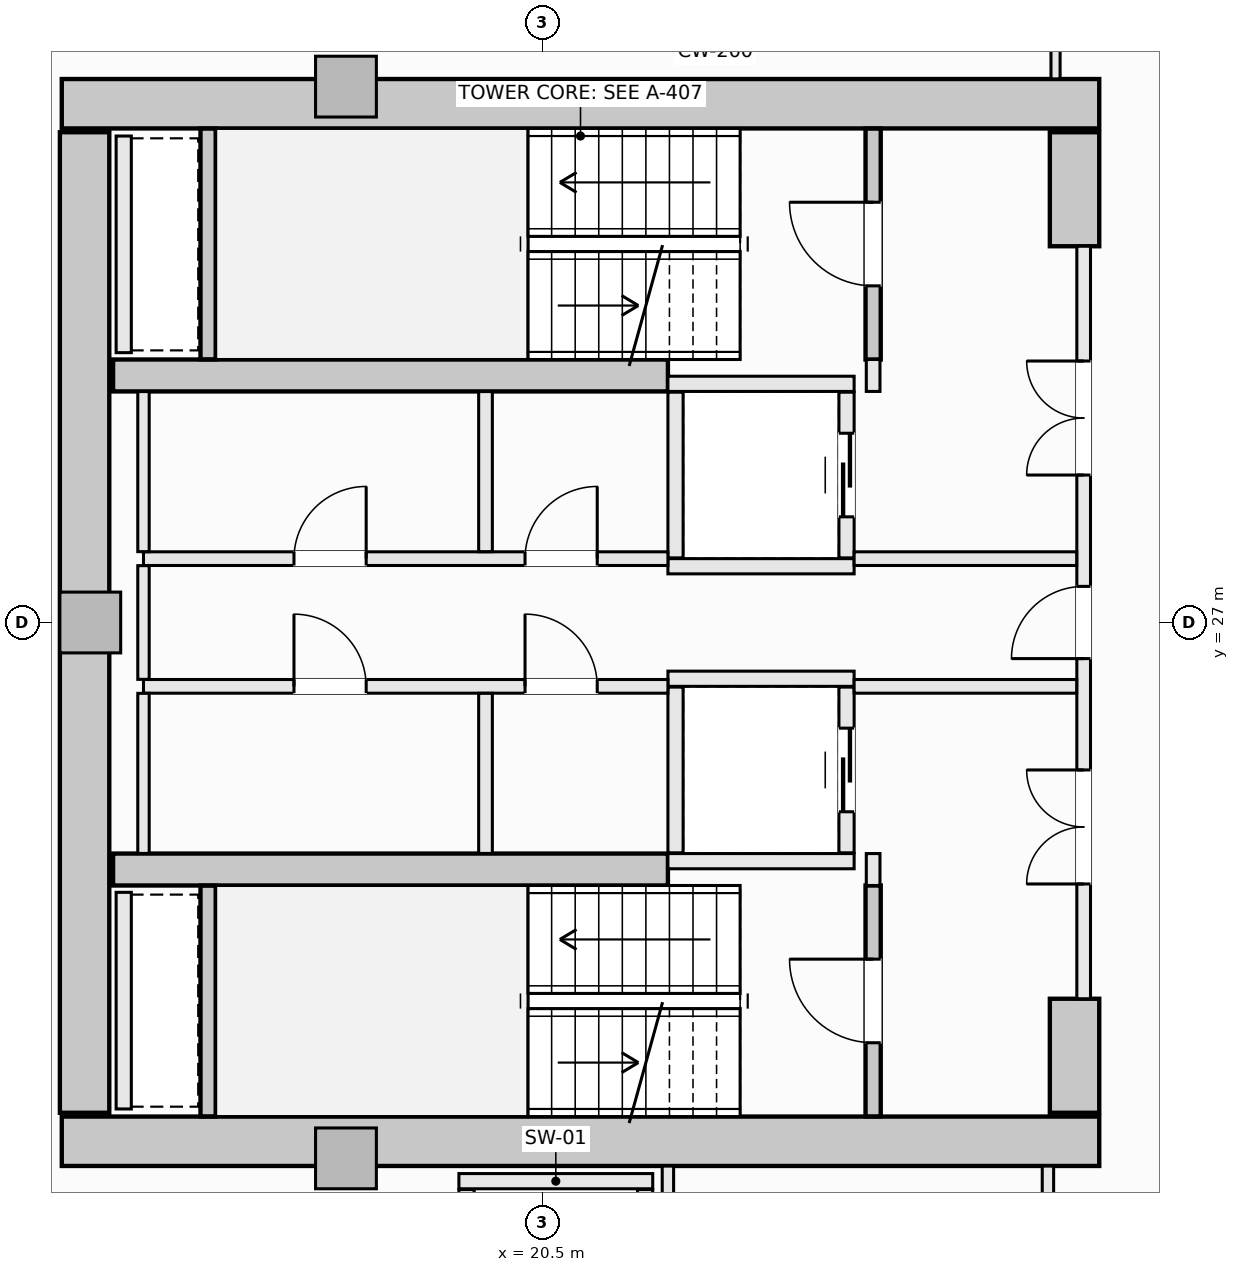
"""IFC4 building model, lengths in metres.
Left out: names, types, materials, properties, quantities, classifications, styles, units other than length and angle.
Written with IfcOpenShell. Run it as: python <this file> out.ifc"""

import sys

from ifc_helpers import new_model, si_unit, direction, frame, frame_2d, origin, origin_2d, place, context, subcontext, project, spatial, rectangle, extrude, element, fill, save


model = new_model("IFC4")
c1 = context("Model", 3, precision=1e-05, world=origin(), true_north=direction((0.0, 1.0)))
c2 = subcontext(c1, "Body", "Model", "MODEL_VIEW")
j1 = project(units=[si_unit("LENGTHUNIT", "METRE"), si_unit("PLANEANGLEUNIT", "RADIAN")], contexts=[c1])
p1 = place(None, origin())
s1 = spatial("IfcSite", under=j1, at=p1, CompositionType="ELEMENT")
p2 = place(p1, origin())
s2 = spatial("IfcBuilding", under=s1, at=p2, CompositionType="ELEMENT")
p3 = place(p2, frame((0.0, 0.0, 183.5)))
s3 = spatial("IfcBuildingStorey", under=s2, at=p3, CompositionType="ELEMENT", Elevation=183.5)
for number, where, z_axis, x_axis in (
    (1, (14.175, 33.825, -0.27), (0.0, 0.0, 1.0), (1.0, 0.0, 0.0)),
    (2, (14.175, 20.175, -0.27), (0.0, 0.0, 1.0), (1.0, 0.0, 0.0)),
):
    element("IfcWall", number, at=place(p3, frame(where, z_axis=z_axis, x_axis=x_axis)), inside=s3, PredefinedType="SHEAR", context=c2, shape_type="SweptSolid", body=[
        extrude(rectangle(XDim=13.65, YDim=0.65, at=frame_2d((6.825, 0.0))), origin(), (0.0, 0.0, 1.0), 3.35),
    ])
p4 = place(p3, frame((14.475, 20.55, -0.27), z_axis=(0.0, 0.0, 1.0), x_axis=(0.0, 1.0, 0.0)))
e3 = element("IfcWall", 3, at=p4, inside=s3, PredefinedType="SHEAR", context=c2, shape_type="SweptSolid", body=[
    extrude(rectangle(XDim=12.9, YDim=0.65, at=frame_2d((6.45, 0.0))), origin(), (0.0, 0.0, 1.0), 3.35),
])
for number, where, z_axis, x_axis in (
    (4, (27.5, 31.95, -0.27), (0.0, 0.0, 1.0), (0.0, 1.0, 0.0)),
    (5, (27.5, 20.55, -0.27), (0.0, 0.0, 1.0), (0.0, 1.0, 0.0)),
):
    element("IfcWall", number, at=place(p3, frame(where, z_axis=z_axis, x_axis=x_axis)), inside=s3, PredefinedType="SHEAR", context=c2, shape_type="SweptSolid", body=[
        extrude(rectangle(XDim=1.5, YDim=0.65, at=frame_2d((0.75, 0.0))), origin(), (0.0, 0.0, 1.0), 3.35),
    ])
for number, where, z_axis, x_axis in (
    (6, (14.85, 30.25, -0.27), (0.0, 0.0, 1.0), (1.0, 0.0, 0.0)),
    (7, (14.85, 23.75, -0.27), (0.0, 0.0, 1.0), (1.0, 0.0, 0.0)),
):
    element("IfcWall", number, at=place(p3, frame(where, z_axis=z_axis, x_axis=x_axis)), inside=s3, PredefinedType="SHEAR", context=c2, shape_type="SweptSolid", body=[
        extrude(rectangle(XDim=7.3, YDim=0.42, at=frame_2d((3.65, 0.0))), origin(), (0.0, 0.0, 1.0), 3.35),
    ])
for number, where, z_axis, x_axis in (
    (8, (17.914, 34.05, -0.27), (0.0, 0.0, 1.0), (1.0, 0.0, 0.0)),
    (9, (14.55, 27.0, -0.27), (0.0, 0.0, 1.0), (1.0, 0.0, 0.0)),
    (10, (17.914, 19.95, -0.27), (0.0, 0.0, 1.0), (1.0, 0.0, 0.0)),
):
    element("IfcColumn", number, at=place(p3, frame(where, z_axis=z_axis, x_axis=x_axis)), inside=s3, PredefinedType="PILASTER", context=c2, shape_type="SweptSolid", body=[
        extrude(rectangle(XDim=0.8, YDim=0.8, at=origin_2d()), origin(), (0.0, 0.0, 1.0), 3.35),
    ])
p5 = place(p3, frame((24.85, 30.46, -0.27), z_axis=(0.0, 0.0, 1.0), x_axis=(0.0, 1.0, 0.0)))
e11 = element("IfcWall", 11, at=p5, inside=s3, PredefinedType="SHEAR", context=c2, shape_type="SweptSolid", body=[
    extrude(rectangle(XDim=3.038, YDim=0.2, at=frame_2d((1.519, 0.0))), origin(), (0.0, 0.0, 1.0), 3.35),
])
p6 = place(p5, frame((0.969, 0.0, 0.27)))
e12 = element("IfcOpeningElement", 12, at=p6, cuts=e11, PredefinedType="OPENING", context=c2, shape_type="SweptSolid", body=[
    extrude(rectangle(XDim=1.1, YDim=2.15, at=frame_2d((0.55, 1.075))), frame((0.0, 0.11, 0.0), z_axis=(0.0, -1.0, 0.0), x_axis=(1.0, 0.0, 0.0)), (0.0, 0.0, 1.0), 0.22),
])
p7 = place(p3, frame((16.1, 30.462, -0.27), z_axis=(0.0, 0.0, 1.0), x_axis=(0.0, 1.0, 0.0)))
e13 = element("IfcWall", 13, at=p7, inside=s3, PredefinedType="SHEAR", context=c2, shape_type="SweptSolid", body=[
    extrude(rectangle(XDim=3.036, YDim=0.2, at=frame_2d((1.518, 0.0))), origin(), (0.0, 0.0, 1.0), 3.35),
])
p8 = place(p3, frame((24.85, 20.502, -0.27), z_axis=(0.0, 0.0, 1.0), x_axis=(0.0, 1.0, 0.0)))
e14 = element("IfcWall", 14, at=p8, inside=s3, PredefinedType="SHEAR", context=c2, shape_type="SweptSolid", body=[
    extrude(rectangle(XDim=3.038, YDim=0.2, at=frame_2d((1.519, 0.0))), origin(), (0.0, 0.0, 1.0), 3.35),
])
p9 = place(p8, frame((0.969, 0.0, 0.27)))
e15 = element("IfcOpeningElement", 15, at=p9, cuts=e14, PredefinedType="OPENING", context=c2, shape_type="SweptSolid", body=[
    extrude(rectangle(XDim=1.1, YDim=2.15, at=frame_2d((0.55, 1.075))), frame((0.0, 0.11, 0.0), z_axis=(0.0, -1.0, 0.0), x_axis=(1.0, 0.0, 0.0)), (0.0, 0.0, 1.0), 0.22),
])
p10 = place(p3, frame((16.1, 20.502, -0.27), z_axis=(0.0, 0.0, 1.0), x_axis=(0.0, 1.0, 0.0)))
e16 = element("IfcWall", 16, at=p10, inside=s3, PredefinedType="SHEAR", context=c2, shape_type="SweptSolid", body=[
    extrude(rectangle(XDim=3.036, YDim=0.2, at=frame_2d((1.518, 0.0))), origin(), (0.0, 0.0, 1.0), 3.35),
])
for number, where, z_axis, x_axis in (
    (17, (22.15, 30.14, 0.0), (0.0, 0.0, 1.0), (1.0, 0.0, 0.0)),
    (18, (22.15, 27.74, 0.0), (0.0, 0.0, 1.0), (1.0, 0.0, 0.0)),
):
    element("IfcWall", number, at=place(p3, frame(where, z_axis=z_axis, x_axis=x_axis)), inside=s3, PredefinedType="SOLIDWALL", context=c2, shape_type="SweptSolid", body=[
        extrude(rectangle(XDim=2.45, YDim=0.2, at=frame_2d((1.225, 0.0))), origin(), (0.0, 0.0, 1.0), 3.08),
    ])
p11 = place(p3, frame((22.25, 27.85, 0.0), z_axis=(0.0, 0.0, 1.0), x_axis=(0.0, 1.0, 0.0)))
e19 = element("IfcWall", 19, at=p11, inside=s3, PredefinedType="SOLIDWALL", context=c2, shape_type="SweptSolid", body=[
    extrude(rectangle(XDim=2.18, YDim=0.2, at=frame_2d((1.09, 0.0))), origin(), (0.0, 0.0, 1.0), 3.08),
])
p12 = place(p3, frame((24.5, 27.85, 0.0), z_axis=(0.0, 0.0, 1.0), x_axis=(0.0, 1.0, 0.0)))
e20 = element("IfcWall", 20, at=p12, inside=s3, PredefinedType="SOLIDWALL", context=c2, shape_type="SweptSolid", body=[
    extrude(rectangle(XDim=2.18, YDim=0.2, at=frame_2d((1.09, 0.0))), origin(), (0.0, 0.0, 1.0), 3.08),
])
p13 = place(p12, frame((0.54, 0.0, 0.0)))
e21 = element("IfcOpeningElement", 21, at=p13, cuts=e20, PredefinedType="OPENING", context=c2, shape_type="SweptSolid", body=[
    extrude(rectangle(XDim=1.1, YDim=2.2, at=frame_2d((0.55, 1.1))), frame((0.0, 0.11, 0.0), z_axis=(0.0, -1.0, 0.0), x_axis=(1.0, 0.0, 0.0)), (0.0, 0.0, 1.0), 0.22),
])
for number, where, z_axis, x_axis in (
    (22, (22.15, 26.26, 0.0), (0.0, 0.0, 1.0), (1.0, 0.0, 0.0)),
    (23, (22.15, 23.86, 0.0), (0.0, 0.0, 1.0), (1.0, 0.0, 0.0)),
):
    element("IfcWall", number, at=place(p3, frame(where, z_axis=z_axis, x_axis=x_axis)), inside=s3, PredefinedType="SOLIDWALL", context=c2, shape_type="SweptSolid", body=[
        extrude(rectangle(XDim=2.45, YDim=0.2, at=frame_2d((1.225, 0.0))), origin(), (0.0, 0.0, 1.0), 3.08),
    ])
p14 = place(p3, frame((22.25, 23.97, 0.0), z_axis=(0.0, 0.0, 1.0), x_axis=(0.0, 1.0, 0.0)))
e24 = element("IfcWall", 24, at=p14, inside=s3, PredefinedType="SOLIDWALL", context=c2, shape_type="SweptSolid", body=[
    extrude(rectangle(XDim=2.18, YDim=0.2, at=frame_2d((1.09, 0.0))), origin(), (0.0, 0.0, 1.0), 3.08),
])
p15 = place(p3, frame((24.5, 23.97, 0.0), z_axis=(0.0, 0.0, 1.0), x_axis=(0.0, 1.0, 0.0)))
e25 = element("IfcWall", 25, at=p15, inside=s3, PredefinedType="SOLIDWALL", context=c2, shape_type="SweptSolid", body=[
    extrude(rectangle(XDim=2.18, YDim=0.2, at=frame_2d((1.09, 0.0))), origin(), (0.0, 0.0, 1.0), 3.08),
])
p16 = place(p15, frame((0.54, 0.0, 0.0)))
e26 = element("IfcOpeningElement", 26, at=p16, cuts=e25, PredefinedType="OPENING", context=c2, shape_type="SweptSolid", body=[
    extrude(rectangle(XDim=1.1, YDim=2.2, at=frame_2d((0.55, 1.1))), frame((0.0, 0.11, 0.0), z_axis=(0.0, -1.0, 0.0), x_axis=(1.0, 0.0, 0.0)), (0.0, 0.0, 1.0), 0.22),
])
p17 = place(p3, frame((19.4, 19.65, 0.0), z_axis=(0.0, 0.0, 1.0), x_axis=(1.0, 0.0, 0.0)))
e27 = element("IfcWall", 27, at=p17, inside=s3, PredefinedType="SOLIDWALL", context=c2, shape_type="SweptSolid", body=[
    extrude(rectangle(XDim=2.55, YDim=0.2, at=frame_2d((1.275, 0.0))), origin(), (0.0, 0.0, 1.0), 3.08),
])
for number, where, z_axis, x_axis in (
    (28, (19.5, 17.01, 0.0), (0.0, 0.0, 1.0), (0.0, 1.0, 0.0)),
    (29, (21.85, 17.01, 0.0), (0.0, 0.0, 1.0), (0.0, 1.0, 0.0)),
):
    element("IfcWall", number, at=place(p3, frame(where, z_axis=z_axis, x_axis=x_axis)), inside=s3, PredefinedType="SOLIDWALL", context=c2, shape_type="SweptSolid", body=[
        extrude(rectangle(XDim=2.53, YDim=0.2, at=frame_2d((1.265, 0.0))), origin(), (0.0, 0.0, 1.0), 3.08),
    ])
for number, where, z_axis, x_axis in (
    (30, (14.99, 30.55, 0.0), (0.0, 0.0, 1.0), (0.0, 1.0, 0.0)),
    (31, (14.99, 20.6, 0.0), (0.0, 0.0, 1.0), (0.0, 1.0, 0.0)),
):
    element("IfcWall", number, at=place(p3, frame(where, z_axis=z_axis, x_axis=x_axis)), inside=s3, PredefinedType="SOLIDWALL", context=c2, shape_type="SweptSolid", body=[
        extrude(rectangle(XDim=2.85, YDim=0.2, at=frame_2d((1.425, 0.0))), origin(), (0.0, 0.0, 1.0), 3.08),
    ])
for number, where, z_axis, x_axis in (
    (32, (24.85, 23.54, 0.0), (0.0, 0.0, 1.0), (0.0, 1.0, 0.0)),
    (33, (24.85, 30.04, 0.0), (0.0, 0.0, 1.0), (0.0, 1.0, 0.0)),
):
    element("IfcWall", number, at=place(p3, frame(where, z_axis=z_axis, x_axis=x_axis)), inside=s3, PredefinedType="SOLIDWALL", context=c2, shape_type="SweptSolid", body=[
        extrude(rectangle(XDim=0.42, YDim=0.18, at=frame_2d((0.21, 0.0))), origin(), (0.0, 0.0, 1.0), 3.08),
    ])
p18 = place(p3, frame((27.62, 22.05, 0.0), z_axis=(0.0, 0.0, 1.0), x_axis=(0.0, 1.0, 0.0)))
e34 = element("IfcWall", 34, at=p18, inside=s3, PredefinedType="SOLIDWALL", context=c2, shape_type="SweptSolid", body=[
    extrude(rectangle(XDim=9.9, YDim=0.18, at=frame_2d((4.95, 0.0))), origin(), (0.0, 0.0, 1.0), 3.08),
])
p19 = place(p18, frame((4.475, 0.0, 0.0)))
e35 = element("IfcOpeningElement", 35, at=p19, cuts=e34, PredefinedType="OPENING", context=c2, shape_type="SweptSolid", body=[
    extrude(rectangle(XDim=0.95, YDim=2.1, at=frame_2d((0.475, 1.05))), frame((0.0, 0.1, 0.0), z_axis=(0.0, -1.0, 0.0), x_axis=(1.0, 0.0, 0.0)), (0.0, 0.0, 1.0), 0.2),
])
p20 = place(p18, frame((6.89, 0.0, 0.0)))
e36 = element("IfcOpeningElement", 36, at=p20, cuts=e34, PredefinedType="OPENING", context=c2, shape_type="SweptSolid", body=[
    extrude(rectangle(XDim=1.5, YDim=2.2, at=frame_2d((0.75, 1.1))), frame((0.0, 0.1, 0.0), z_axis=(0.0, -1.0, 0.0), x_axis=(1.0, 0.0, 0.0)), (0.0, 0.0, 1.0), 0.2),
])
p21 = place(p18, frame((1.51, 0.0, 0.0)))
e37 = element("IfcOpeningElement", 37, at=p21, cuts=e34, PredefinedType="OPENING", context=c2, shape_type="SweptSolid", body=[
    extrude(rectangle(XDim=1.5, YDim=2.2, at=frame_2d((0.75, 1.1))), frame((0.0, 0.1, 0.0), z_axis=(0.0, -1.0, 0.0), x_axis=(1.0, 0.0, 0.0)), (0.0, 0.0, 1.0), 0.2),
])
p22 = place(p3, frame((15.25, 27.84, 0.0), z_axis=(0.0, 0.0, 1.0), x_axis=(1.0, 0.0, 0.0)))
e38 = element("IfcWall", 38, at=p22, inside=s3, PredefinedType="SOLIDWALL", context=c2, shape_type="SweptSolid", body=[
    extrude(rectangle(XDim=6.9, YDim=0.18, at=frame_2d((3.45, 0.0))), origin(), (0.0, 0.0, 1.0), 3.08),
])
p23 = place(p22, frame((5.02, 0.0, 0.0)))
e39 = element("IfcOpeningElement", 39, at=p23, cuts=e38, PredefinedType="OPENING", context=c2, shape_type="SweptSolid", body=[
    extrude(rectangle(XDim=0.95, YDim=2.1, at=frame_2d((0.475, 1.05))), frame((0.0, 0.1, 0.0), z_axis=(0.0, -1.0, 0.0), x_axis=(1.0, 0.0, 0.0)), (0.0, 0.0, 1.0), 0.2),
])
p24 = place(p22, frame((1.98, 0.0, 0.0)))
e40 = element("IfcOpeningElement", 40, at=p24, cuts=e38, PredefinedType="OPENING", context=c2, shape_type="SweptSolid", body=[
    extrude(rectangle(XDim=0.95, YDim=2.1, at=frame_2d((0.475, 1.05))), frame((0.0, 0.1, 0.0), z_axis=(0.0, -1.0, 0.0), x_axis=(1.0, 0.0, 0.0)), (0.0, 0.0, 1.0), 0.2),
])
p25 = place(p3, frame((24.6, 27.84, 0.0), z_axis=(0.0, 0.0, 1.0), x_axis=(1.0, 0.0, 0.0)))
e41 = element("IfcWall", 41, at=p25, inside=s3, PredefinedType="SOLIDWALL", context=c2, shape_type="SweptSolid", body=[
    extrude(rectangle(XDim=2.928, YDim=0.18, at=frame_2d((1.464, 0.0))), origin(), (0.0, 0.0, 1.0), 3.08),
])
p26 = place(p3, frame((15.25, 26.16, 0.0), z_axis=(0.0, 0.0, 1.0), x_axis=(1.0, 0.0, 0.0)))
e42 = element("IfcWall", 42, at=p26, inside=s3, PredefinedType="SOLIDWALL", context=c2, shape_type="SweptSolid", body=[
    extrude(rectangle(XDim=6.9, YDim=0.18, at=frame_2d((3.45, 0.0))), origin(), (0.0, 0.0, 1.0), 3.08),
])
p27 = place(p26, frame((5.02, 0.0, 0.0)))
e43 = element("IfcOpeningElement", 43, at=p27, cuts=e42, PredefinedType="OPENING", context=c2, shape_type="SweptSolid", body=[
    extrude(rectangle(XDim=0.95, YDim=2.1, at=frame_2d((0.475, 1.05))), frame((0.0, 0.1, 0.0), z_axis=(0.0, -1.0, 0.0), x_axis=(1.0, 0.0, 0.0)), (0.0, 0.0, 1.0), 0.2),
])
p28 = place(p26, frame((1.98, 0.0, 0.0)))
e44 = element("IfcOpeningElement", 44, at=p28, cuts=e42, PredefinedType="OPENING", context=c2, shape_type="SweptSolid", body=[
    extrude(rectangle(XDim=0.95, YDim=2.1, at=frame_2d((0.475, 1.05))), frame((0.0, 0.1, 0.0), z_axis=(0.0, -1.0, 0.0), x_axis=(1.0, 0.0, 0.0)), (0.0, 0.0, 1.0), 0.2),
])
p29 = place(p3, frame((24.6, 26.16, 0.0), z_axis=(0.0, 0.0, 1.0), x_axis=(1.0, 0.0, 0.0)))
e45 = element("IfcWall", 45, at=p29, inside=s3, PredefinedType="SOLIDWALL", context=c2, shape_type="SweptSolid", body=[
    extrude(rectangle(XDim=2.928, YDim=0.18, at=frame_2d((1.464, 0.0))), origin(), (0.0, 0.0, 1.0), 3.08),
])
p30 = place(p3, frame((15.25, 23.962, 0.0), z_axis=(0.0, 0.0, 1.0), x_axis=(0.0, 1.0, 0.0)))
e46 = element("IfcWall", 46, at=p30, inside=s3, PredefinedType="PARTITIONING", context=c2, shape_type="SweptSolid", body=[
    extrude(rectangle(XDim=2.106, YDim=0.15, at=frame_2d((1.053, 0.0))), origin(), (0.0, 0.0, 1.0), 3.08),
])
p31 = place(p3, frame((15.25, 26.252, 0.0), z_axis=(0.0, 0.0, 1.0), x_axis=(0.0, 1.0, 0.0)))
e47 = element("IfcWall", 47, at=p31, inside=s3, PredefinedType="PARTITIONING", context=c2, shape_type="SweptSolid", body=[
    extrude(rectangle(XDim=1.496, YDim=0.15, at=frame_2d((0.748, 0.0))), origin(), (0.0, 0.0, 1.0), 3.08),
])
p32 = place(p3, frame((15.25, 27.932, 0.0), z_axis=(0.0, 0.0, 1.0), x_axis=(0.0, 1.0, 0.0)))
e48 = element("IfcWall", 48, at=p32, inside=s3, PredefinedType="PARTITIONING", context=c2, shape_type="SweptSolid", body=[
    extrude(rectangle(XDim=2.106, YDim=0.15, at=frame_2d((1.053, 0.0))), origin(), (0.0, 0.0, 1.0), 3.08),
])
for number, where, z_axis, x_axis in (
    (49, (19.75, 23.962, 0.0), (0.0, 0.0, 1.0), (0.0, 1.0, 0.0)),
    (50, (19.75, 27.932, 0.0), (0.0, 0.0, 1.0), (0.0, 1.0, 0.0)),
):
    element("IfcWall", number, at=place(p3, frame(where, z_axis=z_axis, x_axis=x_axis)), inside=s3, PredefinedType="SOLIDWALL", context=c2, shape_type="SweptSolid", body=[
        extrude(rectangle(XDim=2.106, YDim=0.18, at=frame_2d((1.053, 0.0))), origin(), (0.0, 0.0, 1.0), 3.08),
    ])
p33 = place(p3, frame((22.15, 17.127, 0.0), z_axis=(0.0, 0.0, 1.0), x_axis=(0.0, 1.0, 0.0)))
e51 = element("IfcWall", 51, at=p33, inside=s3, PredefinedType="PARTITIONING", context=c2, shape_type="SweptSolid", body=[
    extrude(rectangle(XDim=2.721, YDim=0.15, at=frame_2d((1.36, 0.0))), origin(), (0.0, 0.0, 1.0), 3.08),
])
p34 = place(p3, frame((27.15, 17.127, 0.0), z_axis=(0.0, 0.0, 1.0), x_axis=(0.0, 1.0, 0.0)))
e52 = element("IfcWall", 52, at=p34, inside=s3, PredefinedType="PARTITIONING", context=c2, shape_type="SweptSolid", body=[
    extrude(rectangle(XDim=2.721, YDim=0.15, at=frame_2d((1.36, 0.0))), origin(), (0.0, 0.0, 1.0), 3.08),
])
p35 = place(p34, frame((0.885, 0.0, 0.0)))
e53 = element("IfcOpeningElement", 53, at=p35, cuts=e52, PredefinedType="OPENING", context=c2, shape_type="SweptSolid", body=[
    extrude(rectangle(XDim=0.95, YDim=2.1, at=frame_2d((0.475, 1.05))), frame((0.0, 0.085, 0.0), z_axis=(0.0, -1.0, 0.0), x_axis=(1.0, 0.0, 0.0)), (0.0, 0.0, 1.0), 0.17),
])
p36 = place(p3, frame((27.25, 34.152, 0.0), z_axis=(0.0, 0.0, 1.0), x_axis=(0.0, 1.0, 0.0)))
e54 = element("IfcWall", 54, at=p36, inside=s3, PredefinedType="PARTITIONING", context=c2, shape_type="SweptSolid", body=[
    extrude(rectangle(XDim=0.806, YDim=0.12, at=frame_2d((0.403, 0.0))), origin(), (0.0, 0.0, 1.0), 3.08),
])
p37 = place(p6, origin())
e55 = element("IfcDoor", 55, at=p37, inside=s3, OperationType="SINGLE_SWING_RIGHT", PredefinedType="DOOR", context=c2, shape_type="SweptSolid", body=[
    extrude(rectangle(XDim=1.1, YDim=2.15, at=frame_2d((0.55, 1.075))), frame((0.0, 0.025, 0.0), z_axis=(0.0, -1.0, 0.0), x_axis=(1.0, 0.0, 0.0)), (0.0, 0.0, 1.0), 0.05),
])
fill(e12, e55)
p38 = place(p9, origin())
e56 = element("IfcDoor", 56, at=p38, inside=s3, OperationType="SINGLE_SWING_RIGHT", PredefinedType="DOOR", context=c2, shape_type="SweptSolid", body=[
    extrude(rectangle(XDim=1.1, YDim=2.15, at=frame_2d((0.55, 1.075))), frame((0.0, 0.025, 0.0), z_axis=(0.0, -1.0, 0.0), x_axis=(1.0, 0.0, 0.0)), (0.0, 0.0, 1.0), 0.05),
])
fill(e15, e56)
p39 = place(p13, origin())
e57 = element("IfcDoor", 57, at=p39, inside=s3, OperationType="SLIDING_TO_LEFT", PredefinedType="DOOR", context=c2, shape_type="SweptSolid", body=[
    extrude(rectangle(XDim=1.1, YDim=2.2, at=frame_2d((0.55, 1.1))), frame((0.0, 0.025, 0.0), z_axis=(0.0, -1.0, 0.0), x_axis=(1.0, 0.0, 0.0)), (0.0, 0.0, 1.0), 0.05),
])
fill(e21, e57)
p40 = place(p16, origin())
e58 = element("IfcDoor", 58, at=p40, inside=s3, OperationType="SLIDING_TO_LEFT", PredefinedType="DOOR", context=c2, shape_type="SweptSolid", body=[
    extrude(rectangle(XDim=1.1, YDim=2.2, at=frame_2d((0.55, 1.1))), frame((0.0, 0.025, 0.0), z_axis=(0.0, -1.0, 0.0), x_axis=(1.0, 0.0, 0.0)), (0.0, 0.0, 1.0), 0.05),
])
fill(e26, e58)
p41 = place(p19, origin())
e59 = element("IfcDoor", 59, at=p41, inside=s3, OperationType="SINGLE_SWING_LEFT", PredefinedType="DOOR", context=c2, shape_type="SweptSolid", body=[
    extrude(rectangle(XDim=0.95, YDim=2.1, at=frame_2d((0.475, 1.05))), frame((0.0, 0.025, 0.0), z_axis=(0.0, -1.0, 0.0), x_axis=(1.0, 0.0, 0.0)), (0.0, 0.0, 1.0), 0.05),
])
fill(e35, e59)
p42 = place(p20, origin())
e60 = element("IfcDoor", 60, at=p42, inside=s3, OperationType="DOUBLE_DOOR_SINGLE_SWING", PredefinedType="DOOR", context=c2, shape_type="SweptSolid", body=[
    extrude(rectangle(XDim=1.5, YDim=2.2, at=frame_2d((0.75, 1.1))), frame((0.0, 0.025, 0.0), z_axis=(0.0, -1.0, 0.0), x_axis=(1.0, 0.0, 0.0)), (0.0, 0.0, 1.0), 0.05),
])
fill(e36, e60)
p43 = place(p21, origin())
e61 = element("IfcDoor", 61, at=p43, inside=s3, OperationType="DOUBLE_DOOR_SINGLE_SWING", PredefinedType="DOOR", context=c2, shape_type="SweptSolid", body=[
    extrude(rectangle(XDim=1.5, YDim=2.2, at=frame_2d((0.75, 1.1))), frame((0.0, 0.025, 0.0), z_axis=(0.0, -1.0, 0.0), x_axis=(1.0, 0.0, 0.0)), (0.0, 0.0, 1.0), 0.05),
])
fill(e37, e61)
p44 = place(p23, origin())
e62 = element("IfcDoor", 62, at=p44, inside=s3, OperationType="SINGLE_SWING_RIGHT", PredefinedType="DOOR", context=c2, shape_type="SweptSolid", body=[
    extrude(rectangle(XDim=0.95, YDim=2.1, at=frame_2d((0.475, 1.05))), frame((0.0, 0.025, 0.0), z_axis=(0.0, -1.0, 0.0), x_axis=(1.0, 0.0, 0.0)), (0.0, 0.0, 1.0), 0.05),
])
fill(e39, e62)
p45 = place(p27, origin())
e63 = element("IfcDoor", 63, at=p45, inside=s3, OperationType="SINGLE_SWING_LEFT", PredefinedType="DOOR", context=c2, shape_type="SweptSolid", body=[
    extrude(rectangle(XDim=0.95, YDim=2.1, at=frame_2d((0.475, 1.05))), frame((0.0, 0.025, 0.0), z_axis=(0.0, -1.0, 0.0), x_axis=(1.0, 0.0, 0.0)), (0.0, 0.0, 1.0), 0.05),
])
fill(e43, e63)
p46 = place(p24, origin())
e64 = element("IfcDoor", 64, at=p46, inside=s3, OperationType="SINGLE_SWING_RIGHT", PredefinedType="DOOR", context=c2, shape_type="SweptSolid", body=[
    extrude(rectangle(XDim=0.95, YDim=2.1, at=frame_2d((0.475, 1.05))), frame((0.0, 0.025, 0.0), z_axis=(0.0, -1.0, 0.0), x_axis=(1.0, 0.0, 0.0)), (0.0, 0.0, 1.0), 0.05),
])
fill(e40, e64)
p47 = place(p28, origin())
e65 = element("IfcDoor", 65, at=p47, inside=s3, OperationType="SINGLE_SWING_LEFT", PredefinedType="DOOR", context=c2, shape_type="SweptSolid", body=[
    extrude(rectangle(XDim=0.95, YDim=2.1, at=frame_2d((0.475, 1.05))), frame((0.0, 0.025, 0.0), z_axis=(0.0, -1.0, 0.0), x_axis=(1.0, 0.0, 0.0)), (0.0, 0.0, 1.0), 0.05),
])
fill(e44, e65)
save(model, sys.argv[1])
